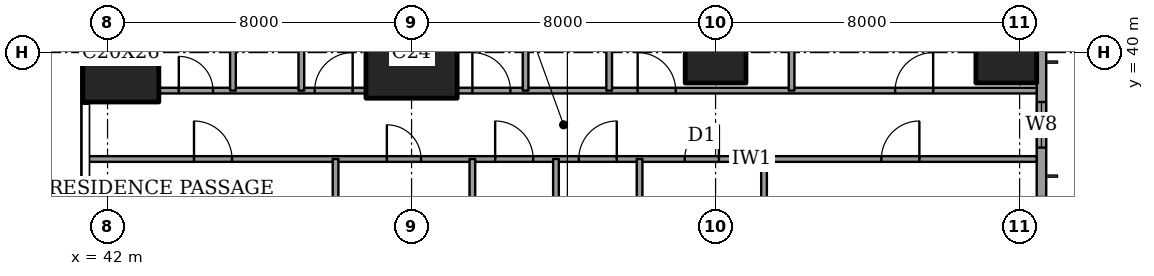
"""IFC4 building model, lengths in metres.
Left out: names, types, materials, properties, quantities, classifications, styles, units other than length and angle.
Written with IfcOpenShell. Run it as: python <this file> out.ifc"""

import sys

from ifc_helpers import new_model, si_unit, direction, frame, frame_2d, origin, origin_2d, place, context, subcontext, project, spatial, rectangle, extrude, element, fill, save


model = new_model("IFC4")
c1 = context("Model", 3, precision=1e-05, world=origin(), true_north=direction((0.0, 1.0)))
c2 = subcontext(c1, "Body", "Model", "MODEL_VIEW")
j1 = project(units=[si_unit("LENGTHUNIT", "METRE"), si_unit("PLANEANGLEUNIT", "RADIAN")], contexts=[c1])
p1 = place(None, origin())
s1 = spatial("IfcSite", under=j1, at=p1, CompositionType="ELEMENT")
p2 = place(p1, origin())
s2 = spatial("IfcBuilding", under=s1, at=p2, CompositionType="ELEMENT")
p3 = place(p2, frame((0.0, 0.0, 244.8)))
s3 = spatial("IfcBuildingStorey", under=s2, at=p3, CompositionType="ELEMENT", Elevation=244.8)
p4 = place(p3, frame((42.35, 40.0, 0.0), z_axis=(0.0, 0.0, 1.0), x_axis=(1.0, 0.0, 0.0)))
e1 = element("IfcColumn", 1, at=p4, inside=s3, PredefinedType="COLUMN", context=c2, shape_type="SweptSolid", body=[
    extrude(rectangle(XDim=2.0, YDim=2.6, at=origin_2d()), origin(), (0.0, 0.0, 1.0), 3.6),
])
p5 = place(p3, frame((50.0, 40.0, 0.0), z_axis=(0.0, 0.0, 1.0), x_axis=(1.0, 0.0, 0.0)))
e2 = element("IfcColumn", 2, at=p5, inside=s3, PredefinedType="COLUMN", context=c2, shape_type="SweptSolid", body=[
    extrude(rectangle(XDim=2.4, YDim=2.4, at=origin_2d()), origin(), (0.0, 0.0, 1.0), 3.6),
])
for number, where, z_axis, x_axis in (
    (3, (58.0, 40.0, 0.0), (0.0, 0.0, 1.0), (1.0, 0.0, 0.0)),
    (4, (65.65, 40.0, 0.0), (0.0, 0.0, 1.0), (1.0, 0.0, 0.0)),
):
    element("IfcColumn", number, at=place(p3, frame(where, z_axis=z_axis, x_axis=x_axis)), inside=s3, PredefinedType="COLUMN", context=c2, shape_type="SweptSolid", body=[
        extrude(rectangle(XDim=1.6, YDim=1.6, at=origin_2d()), origin(), (0.0, 0.0, 1.0), 3.6),
    ])
p6 = place(p3, frame((66.575, 3.175, 0.0), z_axis=(0.0, 0.0, 1.0), x_axis=(0.0, 1.0, 0.0)))
e5 = element("IfcWall", 5, at=p6, inside=s3, PredefinedType="SOLIDWALL", context=c2, shape_type="SweptSolid", body=[
    extrude(rectangle(XDim=41.65, YDim=0.25, at=frame_2d((20.825, 0.0))), origin(), (0.0, 0.0, 1.0), 3.6),
])
p7 = place(p6, frame((0.875, 0.0, 0.6)))
e6 = element("IfcOpeningElement", 6, at=p7, cuts=e5, PredefinedType="OPENING", context=c2, shape_type="SweptSolid", body=[
    extrude(rectangle(XDim=2.4, YDim=2.0, at=frame_2d((1.2, 1.0))), frame((0.0, 0.135, 0.0), z_axis=(0.0, -1.0, 0.0), x_axis=(1.0, 0.0, 0.0)), (0.0, 0.0, 1.0), 0.27),
])
p8 = place(p6, frame((6.0, 0.0, 0.6)))
e7 = element("IfcOpeningElement", 7, at=p8, cuts=e5, PredefinedType="OPENING", context=c2, shape_type="SweptSolid", body=[
    extrude(rectangle(XDim=1.2, YDim=2.0, at=frame_2d((0.6, 1.0))), frame((0.0, 0.135, 0.0), z_axis=(0.0, -1.0, 0.0), x_axis=(1.0, 0.0, 0.0)), (0.0, 0.0, 1.0), 0.27),
])
p9 = place(p6, frame((8.525, 0.0, 0.6)))
e8 = element("IfcOpeningElement", 8, at=p9, cuts=e5, PredefinedType="OPENING", context=c2, shape_type="SweptSolid", body=[
    extrude(rectangle(XDim=2.4, YDim=2.0, at=frame_2d((1.2, 1.0))), frame((0.0, 0.135, 0.0), z_axis=(0.0, -1.0, 0.0), x_axis=(1.0, 0.0, 0.0)), (0.0, 0.0, 1.0), 0.27),
])
p10 = place(p6, frame((15.725, 0.0, 0.6)))
e9 = element("IfcOpeningElement", 9, at=p10, cuts=e5, PredefinedType="OPENING", context=c2, shape_type="SweptSolid", body=[
    extrude(rectangle(XDim=2.4, YDim=2.0, at=frame_2d((1.2, 1.0))), frame((0.0, 0.135, 0.0), z_axis=(0.0, -1.0, 0.0), x_axis=(1.0, 0.0, 0.0)), (0.0, 0.0, 1.0), 0.27),
])
p11 = place(p6, frame((23.525, 0.0, 0.6)))
e10 = element("IfcOpeningElement", 10, at=p11, cuts=e5, PredefinedType="OPENING", context=c2, shape_type="SweptSolid", body=[
    extrude(rectangle(XDim=2.4, YDim=2.0, at=frame_2d((1.2, 1.0))), frame((0.0, 0.135, 0.0), z_axis=(0.0, -1.0, 0.0), x_axis=(1.0, 0.0, 0.0)), (0.0, 0.0, 1.0), 0.27),
])
p12 = place(p6, frame((30.625, 0.0, 0.6)))
e11 = element("IfcOpeningElement", 11, at=p12, cuts=e5, PredefinedType="OPENING", context=c2, shape_type="SweptSolid", body=[
    extrude(rectangle(XDim=2.4, YDim=2.0, at=frame_2d((1.2, 1.0))), frame((0.0, 0.135, 0.0), z_axis=(0.0, -1.0, 0.0), x_axis=(1.0, 0.0, 0.0)), (0.0, 0.0, 1.0), 0.27),
])
p13 = place(p6, frame((34.325, 0.0, 0.6)))
e12 = element("IfcOpeningElement", 12, at=p13, cuts=e5, PredefinedType="OPENING", context=c2, shape_type="SweptSolid", body=[
    extrude(rectangle(XDim=1.2, YDim=2.0, at=frame_2d((0.6, 1.0))), frame((0.0, 0.135, 0.0), z_axis=(0.0, -1.0, 0.0), x_axis=(1.0, 0.0, 0.0)), (0.0, 0.0, 1.0), 0.27),
])
p14 = place(p6, frame((38.375, 0.0, 0.6)))
e13 = element("IfcOpeningElement", 13, at=p14, cuts=e5, PredefinedType="OPENING", context=c2, shape_type="SweptSolid", body=[
    extrude(rectangle(XDim=2.4, YDim=2.0, at=frame_2d((1.2, 1.0))), frame((0.0, 0.135, 0.0), z_axis=(0.0, -1.0, 0.0), x_axis=(1.0, 0.0, 0.0)), (0.0, 0.0, 1.0), 0.27),
])
p15 = place(p3, frame((41.439, 37.2, 0.0), z_axis=(0.0, 0.0, 1.0), x_axis=(1.0, 0.0, 0.0)))
e14 = element("IfcWall", 14, at=p15, inside=s3, PredefinedType="PARTITIONING", context=c2, shape_type="SweptSolid", body=[
    extrude(rectangle(XDim=25.011, YDim=0.15, at=frame_2d((12.505, 0.0))), origin(), (0.0, 0.0, 1.0), 3.35),
])
p16 = place(p15, frame((10.761, 0.0, 0.0)))
e15 = element("IfcOpeningElement", 15, at=p16, cuts=e14, PredefinedType="OPENING", context=c2, shape_type="SweptSolid", body=[
    extrude(rectangle(XDim=1.0, YDim=2.1, at=frame_2d((0.5, 1.05))), frame((0.0, 0.085, 0.0), z_axis=(0.0, -1.0, 0.0), x_axis=(1.0, 0.0, 0.0)), (0.0, 0.0, 1.0), 0.17),
])
p17 = place(p15, frame((20.924, 0.0, 0.0)))
e16 = element("IfcOpeningElement", 16, at=p17, cuts=e14, PredefinedType="OPENING", context=c2, shape_type="SweptSolid", body=[
    extrude(rectangle(XDim=1.0, YDim=2.1, at=frame_2d((0.5, 1.05))), frame((0.0, 0.085, 0.0), z_axis=(0.0, -1.0, 0.0), x_axis=(1.0, 0.0, 0.0)), (0.0, 0.0, 1.0), 0.17),
])
p18 = place(p15, frame((15.749, 0.0, 0.0)))
e17 = element("IfcOpeningElement", 17, at=p18, cuts=e14, PredefinedType="OPENING", context=c2, shape_type="SweptSolid", body=[
    extrude(rectangle(XDim=0.9, YDim=2.1, at=frame_2d((0.45, 1.05))), frame((0.0, 0.085, 0.0), z_axis=(0.0, -1.0, 0.0), x_axis=(1.0, 0.0, 0.0)), (0.0, 0.0, 1.0), 0.17),
])
p19 = place(p15, frame((12.961, 0.0, 0.0)))
e18 = element("IfcOpeningElement", 18, at=p19, cuts=e14, PredefinedType="OPENING", context=c2, shape_type="SweptSolid", body=[
    extrude(rectangle(XDim=1.0, YDim=2.1, at=frame_2d((0.5, 1.05))), frame((0.0, 0.085, 0.0), z_axis=(0.0, -1.0, 0.0), x_axis=(1.0, 0.0, 0.0)), (0.0, 0.0, 1.0), 0.17),
])
p20 = place(p15, frame((7.911, 0.0, 0.0)))
e19 = element("IfcOpeningElement", 19, at=p20, cuts=e14, PredefinedType="OPENING", context=c2, shape_type="SweptSolid", body=[
    extrude(rectangle(XDim=0.9, YDim=2.1, at=frame_2d((0.45, 1.05))), frame((0.0, 0.085, 0.0), z_axis=(0.0, -1.0, 0.0), x_axis=(1.0, 0.0, 0.0)), (0.0, 0.0, 1.0), 0.17),
])
p21 = place(p15, frame((2.836, 0.0, 0.0)))
e20 = element("IfcOpeningElement", 20, at=p21, cuts=e14, PredefinedType="OPENING", context=c2, shape_type="SweptSolid", body=[
    extrude(rectangle(XDim=1.0, YDim=2.1, at=frame_2d((0.5, 1.05))), frame((0.0, 0.085, 0.0), z_axis=(0.0, -1.0, 0.0), x_axis=(1.0, 0.0, 0.0)), (0.0, 0.0, 1.0), 0.17),
])
p22 = place(p3, frame((43.35, 39.0, 0.0), z_axis=(0.0, 0.0, 1.0), x_axis=(1.0, 0.0, 0.0)))
e21 = element("IfcWall", 21, at=p22, inside=s3, PredefinedType="PARTITIONING", context=c2, shape_type="SweptSolid", body=[
    extrude(rectangle(XDim=5.45, YDim=0.15, at=frame_2d((2.725, 0.0))), origin(), (0.0, 0.0, 1.0), 3.35),
])
p23 = place(p22, frame((4.1, 0.0, 0.0)))
e22 = element("IfcOpeningElement", 22, at=p23, cuts=e21, PredefinedType="OPENING", context=c2, shape_type="SweptSolid", body=[
    extrude(rectangle(XDim=1.0, YDim=2.1, at=frame_2d((0.5, 1.05))), frame((0.0, 0.085, 0.0), z_axis=(0.0, -1.0, 0.0), x_axis=(1.0, 0.0, 0.0)), (0.0, 0.0, 1.0), 0.17),
])
p24 = place(p22, frame((0.525, 0.0, 0.0)))
e23 = element("IfcOpeningElement", 23, at=p24, cuts=e21, PredefinedType="OPENING", context=c2, shape_type="SweptSolid", body=[
    extrude(rectangle(XDim=0.9, YDim=2.1, at=frame_2d((0.45, 1.05))), frame((0.0, 0.085, 0.0), z_axis=(0.0, -1.0, 0.0), x_axis=(1.0, 0.0, 0.0)), (0.0, 0.0, 1.0), 0.17),
])
p25 = place(p3, frame((51.2, 39.0, 0.0), z_axis=(0.0, 0.0, 1.0), x_axis=(1.0, 0.0, 0.0)))
e24 = element("IfcWall", 24, at=p25, inside=s3, PredefinedType="PARTITIONING", context=c2, shape_type="SweptSolid", body=[
    extrude(rectangle(XDim=15.25, YDim=0.15, at=frame_2d((7.625, 0.0))), origin(), (0.0, 0.0, 1.0), 3.35),
])
p26 = place(p25, frame((11.525, 0.0, 0.0)))
e25 = element("IfcOpeningElement", 25, at=p26, cuts=e24, PredefinedType="OPENING", context=c2, shape_type="SweptSolid", body=[
    extrude(rectangle(XDim=1.0, YDim=2.1, at=frame_2d((0.5, 1.05))), frame((0.0, 0.085, 0.0), z_axis=(0.0, -1.0, 0.0), x_axis=(1.0, 0.0, 0.0)), (0.0, 0.0, 1.0), 0.17),
])
p27 = place(p25, frame((4.75, 0.0, 0.0)))
e26 = element("IfcOpeningElement", 26, at=p27, cuts=e24, PredefinedType="OPENING", context=c2, shape_type="SweptSolid", body=[
    extrude(rectangle(XDim=1.0, YDim=2.1, at=frame_2d((0.5, 1.05))), frame((0.0, 0.085, 0.0), z_axis=(0.0, -1.0, 0.0), x_axis=(1.0, 0.0, 0.0)), (0.0, 0.0, 1.0), 0.17),
])
p28 = place(p25, frame((0.4, 0.0, 0.0)))
e27 = element("IfcOpeningElement", 27, at=p28, cuts=e24, PredefinedType="OPENING", context=c2, shape_type="SweptSolid", body=[
    extrude(rectangle(XDim=1.0, YDim=2.1, at=frame_2d((0.5, 1.05))), frame((0.0, 0.085, 0.0), z_axis=(0.0, -1.0, 0.0), x_axis=(1.0, 0.0, 0.0)), (0.0, 0.0, 1.0), 0.17),
])
p29 = place(p3, frame((45.3, 39.0, 0.0), z_axis=(0.0, 0.0, 1.0), x_axis=(0.0, 1.0, 0.0)))
e28 = element("IfcWall", 28, at=p29, inside=s3, PredefinedType="PARTITIONING", context=c2, shape_type="SweptSolid", body=[
    extrude(rectangle(XDim=9.45, YDim=0.15, at=frame_2d((4.725, 0.0))), origin(), (0.0, 0.0, 1.0), 3.35),
])
p30 = place(p3, frame((47.1, 39.0, 0.0), z_axis=(0.0, 0.0, 1.0), x_axis=(0.0, 1.0, 0.0)))
e29 = element("IfcWall", 29, at=p30, inside=s3, PredefinedType="PARTITIONING", context=c2, shape_type="SweptSolid", body=[
    extrude(rectangle(XDim=4.7, YDim=0.15, at=frame_2d((2.35, 0.0))), origin(), (0.0, 0.0, 1.0), 3.35),
])
p31 = place(p30, frame((1.9, 0.0, 0.0)))
e30 = element("IfcOpeningElement", 30, at=p31, cuts=e29, PredefinedType="OPENING", context=c2, shape_type="SweptSolid", body=[
    extrude(rectangle(XDim=0.9, YDim=2.1, at=frame_2d((0.45, 1.05))), frame((0.0, 0.085, 0.0), z_axis=(0.0, -1.0, 0.0), x_axis=(1.0, 0.0, 0.0)), (0.0, 0.0, 1.0), 0.17),
])
p32 = place(p3, frame((48.0, 28.0, 0.0), z_axis=(0.0, 0.0, 1.0), x_axis=(0.0, 1.0, 0.0)))
e31 = element("IfcWall", 31, at=p32, inside=s3, PredefinedType="PARTITIONING", context=c2, shape_type="SweptSolid", body=[
    extrude(rectangle(XDim=9.2, YDim=0.15, at=frame_2d((4.6, 0.0))), origin(), (0.0, 0.0, 1.0), 3.35),
])
p33 = place(p32, frame((0.5, 0.0, 0.0)))
e32 = element("IfcOpeningElement", 32, at=p33, cuts=e31, PredefinedType="OPENING", context=c2, shape_type="SweptSolid", body=[
    extrude(rectangle(XDim=1.0, YDim=2.1, at=frame_2d((0.5, 1.05))), frame((0.0, 0.085, 0.0), z_axis=(0.0, -1.0, 0.0), x_axis=(1.0, 0.0, 0.0)), (0.0, 0.0, 1.0), 0.17),
])
p34 = place(p3, frame((51.6, 30.0, 0.0), z_axis=(0.0, 0.0, 1.0), x_axis=(0.0, 1.0, 0.0)))
e33 = element("IfcWall", 33, at=p34, inside=s3, PredefinedType="PARTITIONING", context=c2, shape_type="SweptSolid", body=[
    extrude(rectangle(XDim=7.2, YDim=0.15, at=frame_2d((3.6, 0.0))), origin(), (0.0, 0.0, 1.0), 3.35),
])
p35 = place(p3, frame((53.0, 39.0, 0.0), z_axis=(0.0, 0.0, 1.0), x_axis=(0.0, 1.0, 0.0)))
e34 = element("IfcWall", 34, at=p35, inside=s3, PredefinedType="PARTITIONING", context=c2, shape_type="SweptSolid", body=[
    extrude(rectangle(XDim=9.45, YDim=0.15, at=frame_2d((4.725, 0.0))), origin(), (0.0, 0.0, 1.0), 3.35),
])
p36 = place(p3, frame((53.8, 30.0, 0.0), z_axis=(0.0, 0.0, 1.0), x_axis=(0.0, 1.0, 0.0)))
e35 = element("IfcWall", 35, at=p36, inside=s3, PredefinedType="PARTITIONING", context=c2, shape_type="SweptSolid", body=[
    extrude(rectangle(XDim=7.2, YDim=0.15, at=frame_2d((3.6, 0.0))), origin(), (0.0, 0.0, 1.0), 3.35),
])
p37 = place(p3, frame((55.2, 39.0, 0.0), z_axis=(0.0, 0.0, 1.0), x_axis=(0.0, 1.0, 0.0)))
e36 = element("IfcWall", 36, at=p37, inside=s3, PredefinedType="PARTITIONING", context=c2, shape_type="SweptSolid", body=[
    extrude(rectangle(XDim=3.4, YDim=0.15, at=frame_2d((1.7, 0.0))), origin(), (0.0, 0.0, 1.0), 3.35),
])
p38 = place(p37, frame((1.25, 0.0, 0.0)))
e37 = element("IfcOpeningElement", 37, at=p38, cuts=e36, PredefinedType="OPENING", context=c2, shape_type="SweptSolid", body=[
    extrude(rectangle(XDim=0.9, YDim=2.1, at=frame_2d((0.45, 1.05))), frame((0.0, 0.085, 0.0), z_axis=(0.0, -1.0, 0.0), x_axis=(1.0, 0.0, 0.0)), (0.0, 0.0, 1.0), 0.17),
])
p39 = place(p3, frame((56.0, 28.0, 0.0), z_axis=(0.0, 0.0, 1.0), x_axis=(0.0, 1.0, 0.0)))
e38 = element("IfcWall", 38, at=p39, inside=s3, PredefinedType="PARTITIONING", context=c2, shape_type="SweptSolid", body=[
    extrude(rectangle(XDim=9.2, YDim=0.15, at=frame_2d((4.6, 0.0))), origin(), (0.0, 0.0, 1.0), 3.35),
])
p40 = place(p39, frame((0.5, 0.0, 0.0)))
e39 = element("IfcOpeningElement", 39, at=p40, cuts=e38, PredefinedType="OPENING", context=c2, shape_type="SweptSolid", body=[
    extrude(rectangle(XDim=1.0, YDim=2.1, at=frame_2d((0.5, 1.05))), frame((0.0, 0.085, 0.0), z_axis=(0.0, -1.0, 0.0), x_axis=(1.0, 0.0, 0.0)), (0.0, 0.0, 1.0), 0.17),
])
p41 = place(p3, frame((59.275, 33.2, 0.0), z_axis=(0.0, 0.0, 1.0), x_axis=(0.0, 1.0, 0.0)))
e40 = element("IfcWall", 40, at=p41, inside=s3, PredefinedType="PARTITIONING", context=c2, shape_type="SweptSolid", body=[
    extrude(rectangle(XDim=4.0, YDim=0.15, at=frame_2d((2.0, 0.0))), origin(), (0.0, 0.0, 1.0), 3.35),
])
p42 = place(p3, frame((60.0, 39.0, 0.0), z_axis=(0.0, 0.0, 1.0), x_axis=(0.0, 1.0, 0.0)))
e41 = element("IfcWall", 41, at=p42, inside=s3, PredefinedType="PARTITIONING", context=c2, shape_type="SweptSolid", body=[
    extrude(rectangle(XDim=9.45, YDim=0.15, at=frame_2d((4.725, 0.0))), origin(), (0.0, 0.0, 1.0), 3.35),
])
p43 = place(p13, origin())
e42 = element("IfcWindow", 42, at=p43, inside=s3, PartitioningType="SINGLE_PANEL", PredefinedType="WINDOW", context=c2, shape_type="SweptSolid", body=[
    extrude(rectangle(XDim=1.2, YDim=2.0, at=frame_2d((0.6, 1.0))), frame((0.0, 0.03, 0.0), z_axis=(0.0, -1.0, 0.0), x_axis=(1.0, 0.0, 0.0)), (0.0, 0.0, 1.0), 0.06),
])
fill(e12, e42)
p44 = place(p26, origin())
e43 = element("IfcDoor", 43, at=p44, inside=s3, OperationType="SINGLE_SWING_LEFT", PredefinedType="DOOR", context=c2, shape_type="SweptSolid", body=[
    extrude(rectangle(XDim=1.0, YDim=2.1, at=frame_2d((0.5, 1.05))), frame((0.0, 0.025, 0.0), z_axis=(0.0, -1.0, 0.0), x_axis=(1.0, 0.0, 0.0)), (0.0, 0.0, 1.0), 0.05),
])
fill(e25, e43)
p45 = place(p27, origin())
e44 = element("IfcDoor", 44, at=p45, inside=s3, OperationType="SINGLE_SWING_RIGHT", PredefinedType="DOOR", context=c2, shape_type="SweptSolid", body=[
    extrude(rectangle(XDim=1.0, YDim=2.1, at=frame_2d((0.5, 1.05))), frame((0.0, 0.025, 0.0), z_axis=(0.0, -1.0, 0.0), x_axis=(1.0, 0.0, 0.0)), (0.0, 0.0, 1.0), 0.05),
])
fill(e26, e44)
p46 = place(p28, origin())
e45 = element("IfcDoor", 45, at=p46, inside=s3, OperationType="SINGLE_SWING_RIGHT", PredefinedType="DOOR", context=c2, shape_type="SweptSolid", body=[
    extrude(rectangle(XDim=1.0, YDim=2.1, at=frame_2d((0.5, 1.05))), frame((0.0, 0.025, 0.0), z_axis=(0.0, -1.0, 0.0), x_axis=(1.0, 0.0, 0.0)), (0.0, 0.0, 1.0), 0.05),
])
fill(e27, e45)
p47 = place(p23, origin())
e46 = element("IfcDoor", 46, at=p47, inside=s3, OperationType="SINGLE_SWING_LEFT", PredefinedType="DOOR", context=c2, shape_type="SweptSolid", body=[
    extrude(rectangle(XDim=1.0, YDim=2.1, at=frame_2d((0.5, 1.05))), frame((0.0, 0.025, 0.0), z_axis=(0.0, -1.0, 0.0), x_axis=(1.0, 0.0, 0.0)), (0.0, 0.0, 1.0), 0.05),
])
fill(e22, e46)
p48 = place(p24, origin())
e47 = element("IfcDoor", 47, at=p48, inside=s3, OperationType="SINGLE_SWING_RIGHT", PredefinedType="DOOR", context=c2, shape_type="SweptSolid", body=[
    extrude(rectangle(XDim=0.9, YDim=2.1, at=frame_2d((0.45, 1.05))), frame((0.0, 0.025, 0.0), z_axis=(0.0, -1.0, 0.0), x_axis=(1.0, 0.0, 0.0)), (0.0, 0.0, 1.0), 0.05),
])
fill(e23, e47)
p49 = place(p16, origin())
e48 = element("IfcDoor", 48, at=p49, inside=s3, OperationType="SINGLE_SWING_RIGHT", PredefinedType="DOOR", context=c2, shape_type="SweptSolid", body=[
    extrude(rectangle(XDim=1.0, YDim=2.1, at=frame_2d((0.5, 1.05))), frame((0.0, 0.025, 0.0), z_axis=(0.0, -1.0, 0.0), x_axis=(1.0, 0.0, 0.0)), (0.0, 0.0, 1.0), 0.05),
])
fill(e15, e48)
p50 = place(p17, origin())
e49 = element("IfcDoor", 49, at=p50, inside=s3, OperationType="SINGLE_SWING_LEFT", PredefinedType="DOOR", context=c2, shape_type="SweptSolid", body=[
    extrude(rectangle(XDim=1.0, YDim=2.1, at=frame_2d((0.5, 1.05))), frame((0.0, 0.025, 0.0), z_axis=(0.0, -1.0, 0.0), x_axis=(1.0, 0.0, 0.0)), (0.0, 0.0, 1.0), 0.05),
])
fill(e16, e49)
p51 = place(p18, origin())
e50 = element("IfcDoor", 50, at=p51, inside=s3, OperationType="SINGLE_SWING_LEFT", PredefinedType="DOOR", context=c2, shape_type="SweptSolid", body=[
    extrude(rectangle(XDim=0.9, YDim=2.1, at=frame_2d((0.45, 1.05))), frame((0.0, 0.025, 0.0), z_axis=(0.0, -1.0, 0.0), x_axis=(1.0, 0.0, 0.0)), (0.0, 0.0, 1.0), 0.05),
])
fill(e17, e50)
p52 = place(p19, origin())
e51 = element("IfcDoor", 51, at=p52, inside=s3, OperationType="SINGLE_SWING_LEFT", PredefinedType="DOOR", context=c2, shape_type="SweptSolid", body=[
    extrude(rectangle(XDim=1.0, YDim=2.1, at=frame_2d((0.5, 1.05))), frame((0.0, 0.025, 0.0), z_axis=(0.0, -1.0, 0.0), x_axis=(1.0, 0.0, 0.0)), (0.0, 0.0, 1.0), 0.05),
])
fill(e18, e51)
p53 = place(p20, origin())
e52 = element("IfcDoor", 52, at=p53, inside=s3, OperationType="SINGLE_SWING_RIGHT", PredefinedType="DOOR", context=c2, shape_type="SweptSolid", body=[
    extrude(rectangle(XDim=0.9, YDim=2.1, at=frame_2d((0.45, 1.05))), frame((0.0, 0.025, 0.0), z_axis=(0.0, -1.0, 0.0), x_axis=(1.0, 0.0, 0.0)), (0.0, 0.0, 1.0), 0.05),
])
fill(e19, e52)
p54 = place(p21, origin())
e53 = element("IfcDoor", 53, at=p54, inside=s3, OperationType="SINGLE_SWING_RIGHT", PredefinedType="DOOR", context=c2, shape_type="SweptSolid", body=[
    extrude(rectangle(XDim=1.0, YDim=2.1, at=frame_2d((0.5, 1.05))), frame((0.0, 0.025, 0.0), z_axis=(0.0, -1.0, 0.0), x_axis=(1.0, 0.0, 0.0)), (0.0, 0.0, 1.0), 0.05),
])
fill(e20, e53)
save(model, sys.argv[1])
